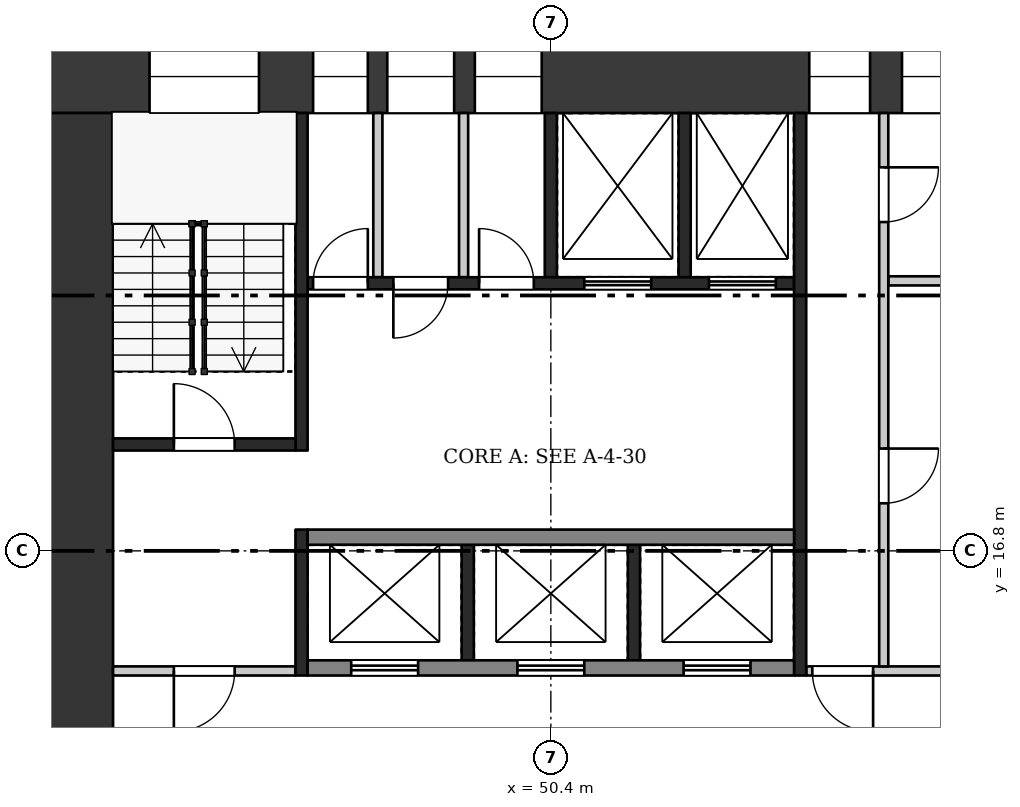
"""IFC4 building model, lengths in metres.
Left out: names, types, materials, properties, quantities, classifications, styles, units other than length and angle.
Written with IfcOpenShell. Run it as: python <this file> out.ifc"""

import sys

from ifc_helpers import new_model, si_unit, direction, frame, frame_2d, origin, place, context, subcontext, project, spatial, rectangle, extrude, element, fill, save


model = new_model("IFC4")
c1 = context("Model", 3, precision=1e-05, world=origin(), true_north=direction((0.0, 1.0)))
c2 = subcontext(c1, "Body", "Model", "MODEL_VIEW")
j1 = project(units=[si_unit("LENGTHUNIT", "METRE"), si_unit("PLANEANGLEUNIT", "RADIAN")], contexts=[c1])
p1 = place(None, origin())
s1 = spatial("IfcSite", under=j1, at=p1, CompositionType="ELEMENT")
p2 = place(p1, origin())
s2 = spatial("IfcBuilding", under=s1, at=p2, CompositionType="ELEMENT")
p3 = place(p2, frame((0.0, 0.0, 214.2)))
s3 = spatial("IfcBuildingStorey", under=s2, at=p3, CompositionType="ELEMENT", Elevation=214.2)
p4 = place(p3, frame((42.0, 24.6, 0.0), z_axis=(0.0, 0.0, 1.0), x_axis=(1.0, 0.0, 0.0)))
e1 = element("IfcWall", 1, at=p4, inside=s3, PredefinedType="SHEAR", context=c2, shape_type="SweptSolid", body=[
    extrude(rectangle(XDim=16.8, YDim=1.2, at=frame_2d((8.4, 0.0))), origin(), (0.0, 0.0, 1.0), 3.22),
])
p5 = place(p4, frame((1.8, 0.0, 0.5)))
e2 = element("IfcOpeningElement", 2, at=p5, cuts=e1, PredefinedType="OPENING", context=c2, shape_type="SweptSolid", body=[
    extrude(rectangle(XDim=1.8, YDim=2.4, at=frame_2d((0.9, 1.2))), frame((0.0, 0.61, 0.0), z_axis=(0.0, -1.0, 0.0), x_axis=(1.0, 0.0, 0.0)), (0.0, 0.0, 1.0), 1.22),
])
p6 = place(p4, frame((4.49, 0.0, 1.6)))
e3 = element("IfcOpeningElement", 3, at=p6, cuts=e1, PredefinedType="OPENING", context=c2, shape_type="SweptSolid", body=[
    extrude(rectangle(XDim=0.9, YDim=1.2, at=frame_2d((0.45, 0.6))), frame((0.0, 0.61, 0.0), z_axis=(0.0, -1.0, 0.0), x_axis=(1.0, 0.0, 0.0)), (0.0, 0.0, 1.0), 1.22),
])
p7 = place(p4, frame((5.71, 0.0, 1.6)))
e4 = element("IfcOpeningElement", 4, at=p7, cuts=e1, PredefinedType="OPENING", context=c2, shape_type="SweptSolid", body=[
    extrude(rectangle(XDim=1.1, YDim=1.2, at=frame_2d((0.55, 0.6))), frame((0.0, 0.61, 0.0), z_axis=(0.0, -1.0, 0.0), x_axis=(1.0, 0.0, 0.0)), (0.0, 0.0, 1.0), 1.22),
])
p8 = place(p4, frame((7.15, 0.0, 1.6)))
e5 = element("IfcOpeningElement", 5, at=p8, cuts=e1, PredefinedType="OPENING", context=c2, shape_type="SweptSolid", body=[
    extrude(rectangle(XDim=1.1, YDim=1.2, at=frame_2d((0.55, 0.6))), frame((0.0, 0.61, 0.0), z_axis=(0.0, -1.0, 0.0), x_axis=(1.0, 0.0, 0.0)), (0.0, 0.0, 1.0), 1.22),
])
p9 = place(p4, frame((12.65, 0.0, 0.6)))
e6 = element("IfcOpeningElement", 6, at=p9, cuts=e1, PredefinedType="OPENING", context=c2, shape_type="SweptSolid", body=[
    extrude(rectangle(XDim=1.0, YDim=2.1, at=frame_2d((0.5, 1.05))), frame((0.0, 0.61, 0.0), z_axis=(0.0, -1.0, 0.0), x_axis=(1.0, 0.0, 0.0)), (0.0, 0.0, 1.0), 1.22),
])
p10 = place(p4, frame((14.175, 0.0, 1.6)))
e7 = element("IfcOpeningElement", 7, at=p10, cuts=e1, PredefinedType="OPENING", context=c2, shape_type="SweptSolid", body=[
    extrude(rectangle(XDim=1.2, YDim=1.2, at=frame_2d((0.6, 0.6))), frame((0.0, 0.61, 0.0), z_axis=(0.0, -1.0, 0.0), x_axis=(1.0, 0.0, 0.0)), (0.0, 0.0, 1.0), 1.22),
])
p11 = place(p3, frame((42.6, 9.6, 0.0), z_axis=(0.0, 0.0, 1.0), x_axis=(0.0, 1.0, 0.0)))
e8 = element("IfcWall", 8, at=p11, inside=s3, PredefinedType="SHEAR", context=c2, shape_type="SweptSolid", body=[
    extrude(rectangle(XDim=14.4, YDim=1.2, at=frame_2d((7.2, 0.0))), origin(), (0.0, 0.0, 1.0), 3.22),
])
p12 = place(p11, frame((2.1, 0.0, 0.0)))
e9 = element("IfcOpeningElement", 9, at=p12, cuts=e8, PredefinedType="OPENING", context=c2, shape_type="SweptSolid", body=[
    extrude(rectangle(XDim=1.8, YDim=2.1, at=frame_2d((0.9, 1.05))), frame((0.0, 0.61, 0.0), z_axis=(0.0, -1.0, 0.0), x_axis=(1.0, 0.0, 0.0)), (0.0, 0.0, 1.0), 1.22),
])
for number, where, z_axis, x_axis in (
    (10, (49.033, 15.0, 0.0), (0.0, 0.0, 1.0), (0.0, 1.0, 0.0)),
    (11, (51.767, 15.0, 0.0), (0.0, 0.0, 1.0), (0.0, 1.0, 0.0)),
):
    element("IfcWall", number, at=place(p3, frame(where, z_axis=z_axis, x_axis=x_axis)), inside=s3, PredefinedType="SHEAR", context=c2, shape_type="SweptSolid", body=[
        extrude(rectangle(XDim=1.9, YDim=0.2, at=frame_2d((0.95, 0.0))), origin(), (0.0, 0.0, 1.0), 3.22),
    ])
p13 = place(p3, frame((46.4, 14.875, 0.0), z_axis=(0.0, 0.0, 1.0), x_axis=(1.0, 0.0, 0.0)))
e12 = element("IfcWall", 12, at=p13, inside=s3, PredefinedType="SHEAR", context=c2, shape_type="SweptSolid", body=[
    extrude(rectangle(XDim=8.0, YDim=0.25, at=frame_2d((4.0, 0.0))), origin(), (0.0, 0.0, 1.0), 3.22),
])
p14 = place(p13, frame((0.717, 0.0, 0.0)))
e13 = element("IfcOpeningElement", 13, at=p14, cuts=e12, PredefinedType="OPENING", context=c2, shape_type="SweptSolid", body=[
    extrude(rectangle(XDim=1.1, YDim=2.1, at=frame_2d((0.55, 1.05))), frame((0.0, 0.135, 0.0), z_axis=(0.0, -1.0, 0.0), x_axis=(1.0, 0.0, 0.0)), (0.0, 0.0, 1.0), 0.27),
])
p15 = place(p13, frame((3.45, 0.0, 0.0)))
e14 = element("IfcOpeningElement", 14, at=p15, cuts=e12, PredefinedType="OPENING", context=c2, shape_type="SweptSolid", body=[
    extrude(rectangle(XDim=1.1, YDim=2.1, at=frame_2d((0.55, 1.05))), frame((0.0, 0.135, 0.0), z_axis=(0.0, -1.0, 0.0), x_axis=(1.0, 0.0, 0.0)), (0.0, 0.0, 1.0), 0.27),
])
p16 = place(p13, frame((6.183, 0.0, 0.0)))
e15 = element("IfcOpeningElement", 15, at=p16, cuts=e12, PredefinedType="OPENING", context=c2, shape_type="SweptSolid", body=[
    extrude(rectangle(XDim=1.1, YDim=2.1, at=frame_2d((0.55, 1.05))), frame((0.0, 0.135, 0.0), z_axis=(0.0, -1.0, 0.0), x_axis=(1.0, 0.0, 0.0)), (0.0, 0.0, 1.0), 0.27),
])
p17 = place(p3, frame((46.4, 17.025, 0.0), z_axis=(0.0, 0.0, 1.0), x_axis=(1.0, 0.0, 0.0)))
e16 = element("IfcWall", 16, at=p17, inside=s3, PredefinedType="SHEAR", context=c2, shape_type="SweptSolid", body=[
    extrude(rectangle(XDim=8.0, YDim=0.25, at=frame_2d((4.0, 0.0))), origin(), (0.0, 0.0, 1.0), 3.22),
])
for number, where, z_axis, x_axis in (
    (17, (50.4, 21.3, 0.0), (0.0, 0.0, 1.0), (0.0, 1.0, 0.0)),
    (18, (52.6, 21.3, 0.0), (0.0, 0.0, 1.0), (0.0, 1.0, 0.0)),
):
    element("IfcWall", number, at=place(p3, frame(where, z_axis=z_axis, x_axis=x_axis)), inside=s3, PredefinedType="SHEAR", context=c2, shape_type="SweptSolid", body=[
        extrude(rectangle(XDim=2.7, YDim=0.2, at=frame_2d((1.35, 0.0))), origin(), (0.0, 0.0, 1.0), 3.22),
    ])
for number, where, z_axis, x_axis in (
    (19, (47.555, 21.3, 0.0), (0.0, 0.0, 1.0), (0.0, 1.0, 0.0)),
    (20, (48.965, 21.3, 0.0), (0.0, 0.0, 1.0), (0.0, 1.0, 0.0)),
):
    element("IfcWall", number, at=place(p3, frame(where, z_axis=z_axis, x_axis=x_axis)), inside=s3, PredefinedType="PARTITIONING", context=c2, shape_type="SweptSolid", body=[
        extrude(rectangle(XDim=2.7, YDim=0.15, at=frame_2d((1.35, 0.0))), origin(), (0.0, 0.0, 1.0), 3.22),
    ])
p18 = place(p3, frame((46.4, 21.2, 0.0), z_axis=(0.0, 0.0, 1.0), x_axis=(1.0, 0.0, 0.0)))
e21 = element("IfcWall", 21, at=p18, inside=s3, PredefinedType="SHEAR", context=c2, shape_type="SweptSolid", body=[
    extrude(rectangle(XDim=8.0, YDim=0.2, at=frame_2d((4.0, 0.0))), origin(), (0.0, 0.0, 1.0), 3.22),
])
p19 = place(p18, frame((0.09, 0.0, 0.0)))
e22 = element("IfcOpeningElement", 22, at=p19, cuts=e21, PredefinedType="OPENING", context=c2, shape_type="SweptSolid", body=[
    extrude(rectangle(XDim=0.9, YDim=2.1, at=frame_2d((0.45, 1.05))), frame((0.0, 0.11, 0.0), z_axis=(0.0, -1.0, 0.0), x_axis=(1.0, 0.0, 0.0)), (0.0, 0.0, 1.0), 0.22),
])
p20 = place(p18, frame((1.41, 0.0, 0.0)))
e23 = element("IfcOpeningElement", 23, at=p20, cuts=e21, PredefinedType="OPENING", context=c2, shape_type="SweptSolid", body=[
    extrude(rectangle(XDim=0.9, YDim=2.1, at=frame_2d((0.45, 1.05))), frame((0.0, 0.11, 0.0), z_axis=(0.0, -1.0, 0.0), x_axis=(1.0, 0.0, 0.0)), (0.0, 0.0, 1.0), 0.22),
])
p21 = place(p18, frame((2.82, 0.0, 0.0)))
e24 = element("IfcOpeningElement", 24, at=p21, cuts=e21, PredefinedType="OPENING", context=c2, shape_type="SweptSolid", body=[
    extrude(rectangle(XDim=0.9, YDim=2.1, at=frame_2d((0.45, 1.05))), frame((0.0, 0.11, 0.0), z_axis=(0.0, -1.0, 0.0), x_axis=(1.0, 0.0, 0.0)), (0.0, 0.0, 1.0), 0.22),
])
p22 = place(p18, frame((4.55, 0.0, 0.0)))
e25 = element("IfcOpeningElement", 25, at=p22, cuts=e21, PredefinedType="OPENING", context=c2, shape_type="SweptSolid", body=[
    extrude(rectangle(XDim=1.1, YDim=2.1, at=frame_2d((0.55, 1.05))), frame((0.0, 0.11, 0.0), z_axis=(0.0, -1.0, 0.0), x_axis=(1.0, 0.0, 0.0)), (0.0, 0.0, 1.0), 0.22),
])
p23 = place(p18, frame((6.6, 0.0, 0.0)))
e26 = element("IfcOpeningElement", 26, at=p23, cuts=e21, PredefinedType="OPENING", context=c2, shape_type="SweptSolid", body=[
    extrude(rectangle(XDim=1.1, YDim=2.1, at=frame_2d((0.55, 1.05))), frame((0.0, 0.11, 0.0), z_axis=(0.0, -1.0, 0.0), x_axis=(1.0, 0.0, 0.0)), (0.0, 0.0, 1.0), 0.22),
])
p24 = place(p3, frame((46.3, 14.75, 0.0), z_axis=(0.0, 0.0, 1.0), x_axis=(0.0, 1.0, 0.0)))
e27 = element("IfcWall", 27, at=p24, inside=s3, PredefinedType="SHEAR", context=c2, shape_type="SweptSolid", body=[
    extrude(rectangle(XDim=2.4, YDim=0.2, at=frame_2d((1.2, 0.0))), origin(), (0.0, 0.0, 1.0), 3.22),
])
p25 = place(p3, frame((46.3, 18.45, 0.0), z_axis=(0.0, 0.0, 1.0), x_axis=(0.0, 1.0, 0.0)))
e28 = element("IfcWall", 28, at=p25, inside=s3, PredefinedType="SHEAR", context=c2, shape_type="SweptSolid", body=[
    extrude(rectangle(XDim=5.55, YDim=0.2, at=frame_2d((2.775, 0.0))), origin(), (0.0, 0.0, 1.0), 3.22),
])
p26 = place(p3, frame((43.2, 14.825, 0.0), z_axis=(0.0, 0.0, 1.0), x_axis=(1.0, 0.0, 0.0)))
e29 = element("IfcWall", 29, at=p26, inside=s3, PredefinedType="PARTITIONING", context=c2, shape_type="SweptSolid", body=[
    extrude(rectangle(XDim=3.0, YDim=0.15, at=frame_2d((1.5, 0.0))), origin(), (0.0, 0.0, 1.0), 3.22),
])
p27 = place(p26, frame((1.0, 0.0, 0.0)))
e30 = element("IfcOpeningElement", 30, at=p27, cuts=e29, PredefinedType="OPENING", context=c2, shape_type="SweptSolid", body=[
    extrude(rectangle(XDim=1.0, YDim=2.1, at=frame_2d((0.5, 1.05))), frame((0.0, 0.085, 0.0), z_axis=(0.0, -1.0, 0.0), x_axis=(1.0, 0.0, 0.0)), (0.0, 0.0, 1.0), 0.17),
])
p28 = place(p3, frame((43.2, 18.55, 0.0), z_axis=(0.0, 0.0, 1.0), x_axis=(1.0, 0.0, 0.0)))
e31 = element("IfcWall", 31, at=p28, inside=s3, PredefinedType="SHEAR", context=c2, shape_type="SweptSolid", body=[
    extrude(rectangle(XDim=3.0, YDim=0.2, at=frame_2d((1.5, 0.0))), origin(), (0.0, 0.0, 1.0), 3.22),
])
p29 = place(p28, frame((1.0, 0.0, 0.0)))
e32 = element("IfcOpeningElement", 32, at=p29, cuts=e31, PredefinedType="OPENING", context=c2, shape_type="SweptSolid", body=[
    extrude(rectangle(XDim=1.0, YDim=2.1, at=frame_2d((0.5, 1.05))), frame((0.0, 0.11, 0.0), z_axis=(0.0, -1.0, 0.0), x_axis=(1.0, 0.0, 0.0)), (0.0, 0.0, 1.0), 0.22),
])
p30 = place(p3, frame((54.5, 14.75, 0.0), z_axis=(0.0, 0.0, 1.0), x_axis=(0.0, 1.0, 0.0)))
e33 = element("IfcWall", 33, at=p30, inside=s3, PredefinedType="SHEAR", context=c2, shape_type="SweptSolid", body=[
    extrude(rectangle(XDim=9.25, YDim=0.2, at=frame_2d((4.625, 0.0))), origin(), (0.0, 0.0, 1.0), 3.22),
])
p31 = place(p3, frame((54.6, 14.825, 0.0), z_axis=(0.0, 0.0, 1.0), x_axis=(1.0, 0.0, 0.0)))
e34 = element("IfcWall", 34, at=p31, inside=s3, PredefinedType="PARTITIONING", context=c2, shape_type="SweptSolid", body=[
    extrude(rectangle(XDim=3.0, YDim=0.15, at=frame_2d((1.5, 0.0))), origin(), (0.0, 0.0, 1.0), 3.22),
])
p32 = place(p31, frame((0.1, 0.0, 0.0)))
e35 = element("IfcOpeningElement", 35, at=p32, cuts=e34, PredefinedType="OPENING", context=c2, shape_type="SweptSolid", body=[
    extrude(rectangle(XDim=1.0, YDim=2.1, at=frame_2d((0.5, 1.05))), frame((0.0, 0.085, 0.0), z_axis=(0.0, -1.0, 0.0), x_axis=(1.0, 0.0, 0.0)), (0.0, 0.0, 1.0), 0.17),
])
p33 = place(p3, frame((55.95, 21.24, 0.0), z_axis=(0.0, 0.0, 1.0), x_axis=(1.0, 0.0, 0.0)))
e36 = element("IfcWall", 36, at=p33, inside=s3, PredefinedType="PARTITIONING", context=c2, shape_type="SweptSolid", body=[
    extrude(rectangle(XDim=1.65, YDim=0.15, at=frame_2d((0.825, 0.0))), origin(), (0.0, 0.0, 1.0), 3.22),
])
p34 = place(p3, frame((55.875, 14.9, 0.0), z_axis=(0.0, 0.0, 1.0), x_axis=(0.0, 1.0, 0.0)))
e37 = element("IfcWall", 37, at=p34, inside=s3, PredefinedType="PARTITIONING", context=c2, shape_type="SweptSolid", body=[
    extrude(rectangle(XDim=9.1, YDim=0.15, at=frame_2d((4.55, 0.0))), origin(), (0.0, 0.0, 1.0), 3.22),
])
p35 = place(p34, frame((2.683, 0.0, 0.0)))
e38 = element("IfcOpeningElement", 38, at=p35, cuts=e37, PredefinedType="OPENING", context=c2, shape_type="SweptSolid", body=[
    extrude(rectangle(XDim=0.9, YDim=2.1, at=frame_2d((0.45, 1.05))), frame((0.0, 0.085, 0.0), z_axis=(0.0, -1.0, 0.0), x_axis=(1.0, 0.0, 0.0)), (0.0, 0.0, 1.0), 0.17),
])
p36 = place(p34, frame((7.308, 0.0, 0.0)))
e39 = element("IfcOpeningElement", 39, at=p36, cuts=e37, PredefinedType="OPENING", context=c2, shape_type="SweptSolid", body=[
    extrude(rectangle(XDim=0.9, YDim=2.1, at=frame_2d((0.45, 1.05))), frame((0.0, 0.085, 0.0), z_axis=(0.0, -1.0, 0.0), x_axis=(1.0, 0.0, 0.0)), (0.0, 0.0, 1.0), 0.17),
])
p37 = place(p14, origin())
e40 = element("IfcDoor", 40, at=p37, inside=s3, OperationType="DOUBLE_DOOR_SLIDING", PredefinedType="DOOR", context=c2, shape_type="SweptSolid", body=[
    extrude(rectangle(XDim=1.1, YDim=2.1, at=frame_2d((0.55, 1.05))), frame((0.0, 0.025, 0.0), z_axis=(0.0, -1.0, 0.0), x_axis=(1.0, 0.0, 0.0)), (0.0, 0.0, 1.0), 0.05),
])
fill(e13, e40)
p38 = place(p15, origin())
e41 = element("IfcDoor", 41, at=p38, inside=s3, OperationType="DOUBLE_DOOR_SLIDING", PredefinedType="DOOR", context=c2, shape_type="SweptSolid", body=[
    extrude(rectangle(XDim=1.1, YDim=2.1, at=frame_2d((0.55, 1.05))), frame((0.0, 0.025, 0.0), z_axis=(0.0, -1.0, 0.0), x_axis=(1.0, 0.0, 0.0)), (0.0, 0.0, 1.0), 0.05),
])
fill(e14, e41)
p39 = place(p16, origin())
e42 = element("IfcDoor", 42, at=p39, inside=s3, OperationType="DOUBLE_DOOR_SLIDING", PredefinedType="DOOR", context=c2, shape_type="SweptSolid", body=[
    extrude(rectangle(XDim=1.1, YDim=2.1, at=frame_2d((0.55, 1.05))), frame((0.0, 0.025, 0.0), z_axis=(0.0, -1.0, 0.0), x_axis=(1.0, 0.0, 0.0)), (0.0, 0.0, 1.0), 0.05),
])
fill(e15, e42)
p40 = place(p19, origin())
e43 = element("IfcDoor", 43, at=p40, inside=s3, OperationType="SINGLE_SWING_RIGHT", PredefinedType="DOOR", context=c2, shape_type="SweptSolid", body=[
    extrude(rectangle(XDim=0.9, YDim=2.1, at=frame_2d((0.45, 1.05))), frame((0.0, 0.025, 0.0), z_axis=(0.0, -1.0, 0.0), x_axis=(1.0, 0.0, 0.0)), (0.0, 0.0, 1.0), 0.05),
])
fill(e22, e43)
p41 = place(p20, frame((0.9, 0.0, 0.0), z_axis=(0.0, 0.0, 1.0), x_axis=(-1.0, 0.0, 0.0)))
e44 = element("IfcDoor", 44, at=p41, inside=s3, OperationType="SINGLE_SWING_RIGHT", PredefinedType="DOOR", context=c2, shape_type="SweptSolid", body=[
    extrude(rectangle(XDim=0.9, YDim=2.1, at=frame_2d((0.45, 1.05))), frame((0.0, 0.025, 0.0), z_axis=(0.0, -1.0, 0.0), x_axis=(1.0, 0.0, 0.0)), (0.0, 0.0, 1.0), 0.05),
])
fill(e23, e44)
p42 = place(p21, origin())
e45 = element("IfcDoor", 45, at=p42, inside=s3, OperationType="SINGLE_SWING_LEFT", PredefinedType="DOOR", context=c2, shape_type="SweptSolid", body=[
    extrude(rectangle(XDim=0.9, YDim=2.1, at=frame_2d((0.45, 1.05))), frame((0.0, 0.025, 0.0), z_axis=(0.0, -1.0, 0.0), x_axis=(1.0, 0.0, 0.0)), (0.0, 0.0, 1.0), 0.05),
])
fill(e24, e45)
p43 = place(p22, origin())
e46 = element("IfcDoor", 46, at=p43, inside=s3, OperationType="DOUBLE_DOOR_SLIDING", PredefinedType="DOOR", context=c2, shape_type="SweptSolid", body=[
    extrude(rectangle(XDim=1.1, YDim=2.1, at=frame_2d((0.55, 1.05))), frame((0.0, 0.025, 0.0), z_axis=(0.0, -1.0, 0.0), x_axis=(1.0, 0.0, 0.0)), (0.0, 0.0, 1.0), 0.05),
])
fill(e25, e46)
p44 = place(p23, origin())
e47 = element("IfcDoor", 47, at=p44, inside=s3, OperationType="DOUBLE_DOOR_SLIDING", PredefinedType="DOOR", context=c2, shape_type="SweptSolid", body=[
    extrude(rectangle(XDim=1.1, YDim=2.1, at=frame_2d((0.55, 1.05))), frame((0.0, 0.025, 0.0), z_axis=(0.0, -1.0, 0.0), x_axis=(1.0, 0.0, 0.0)), (0.0, 0.0, 1.0), 0.05),
])
fill(e26, e47)
p45 = place(p27, frame((1.0, 0.0, 0.0), z_axis=(0.0, 0.0, 1.0), x_axis=(-1.0, 0.0, 0.0)))
e48 = element("IfcDoor", 48, at=p45, inside=s3, OperationType="SINGLE_SWING_RIGHT", PredefinedType="DOOR", context=c2, shape_type="SweptSolid", body=[
    extrude(rectangle(XDim=1.0, YDim=2.1, at=frame_2d((0.5, 1.05))), frame((0.0, 0.025, 0.0), z_axis=(0.0, -1.0, 0.0), x_axis=(1.0, 0.0, 0.0)), (0.0, 0.0, 1.0), 0.05),
])
fill(e30, e48)
p46 = place(p29, origin())
e49 = element("IfcDoor", 49, at=p46, inside=s3, OperationType="SINGLE_SWING_LEFT", PredefinedType="DOOR", context=c2, shape_type="SweptSolid", body=[
    extrude(rectangle(XDim=1.0, YDim=2.1, at=frame_2d((0.5, 1.05))), frame((0.0, 0.025, 0.0), z_axis=(0.0, -1.0, 0.0), x_axis=(1.0, 0.0, 0.0)), (0.0, 0.0, 1.0), 0.05),
])
fill(e32, e49)
p47 = place(p32, frame((1.0, 0.0, 0.0), z_axis=(0.0, 0.0, 1.0), x_axis=(-1.0, 0.0, 0.0)))
e50 = element("IfcDoor", 50, at=p47, inside=s3, OperationType="SINGLE_SWING_LEFT", PredefinedType="DOOR", context=c2, shape_type="SweptSolid", body=[
    extrude(rectangle(XDim=1.0, YDim=2.1, at=frame_2d((0.5, 1.05))), frame((0.0, 0.025, 0.0), z_axis=(0.0, -1.0, 0.0), x_axis=(1.0, 0.0, 0.0)), (0.0, 0.0, 1.0), 0.05),
])
fill(e35, e50)
p48 = place(p35, frame((0.9, 0.0, 0.0), z_axis=(0.0, 0.0, 1.0), x_axis=(-1.0, 0.0, 0.0)))
e51 = element("IfcDoor", 51, at=p48, inside=s3, OperationType="SINGLE_SWING_LEFT", PredefinedType="DOOR", context=c2, shape_type="SweptSolid", body=[
    extrude(rectangle(XDim=0.9, YDim=2.1, at=frame_2d((0.45, 1.05))), frame((0.0, 0.025, 0.0), z_axis=(0.0, -1.0, 0.0), x_axis=(1.0, 0.0, 0.0)), (0.0, 0.0, 1.0), 0.05),
])
fill(e38, e51)
p49 = place(p36, frame((0.9, 0.0, 0.0), z_axis=(0.0, 0.0, 1.0), x_axis=(-1.0, 0.0, 0.0)))
e52 = element("IfcDoor", 52, at=p49, inside=s3, OperationType="SINGLE_SWING_LEFT", PredefinedType="DOOR", context=c2, shape_type="SweptSolid", body=[
    extrude(rectangle(XDim=0.9, YDim=2.1, at=frame_2d((0.45, 1.05))), frame((0.0, 0.025, 0.0), z_axis=(0.0, -1.0, 0.0), x_axis=(1.0, 0.0, 0.0)), (0.0, 0.0, 1.0), 0.05),
])
fill(e39, e52)
p50 = place(p5, origin())
e53 = element("IfcWindow", 53, at=p50, inside=s3, PartitioningType="SINGLE_PANEL", PredefinedType="WINDOW", context=c2, shape_type="SweptSolid", body=[
    extrude(rectangle(XDim=1.8, YDim=2.4, at=frame_2d((0.9, 1.2))), frame((0.0, 0.03, 0.0), z_axis=(0.0, -1.0, 0.0), x_axis=(1.0, 0.0, 0.0)), (0.0, 0.0, 1.0), 0.06),
])
fill(e2, e53)
p51 = place(p6, origin())
e54 = element("IfcWindow", 54, at=p51, inside=s3, PartitioningType="SINGLE_PANEL", PredefinedType="WINDOW", context=c2, shape_type="SweptSolid", body=[
    extrude(rectangle(XDim=0.9, YDim=1.2, at=frame_2d((0.45, 0.6))), frame((0.0, 0.03, 0.0), z_axis=(0.0, -1.0, 0.0), x_axis=(1.0, 0.0, 0.0)), (0.0, 0.0, 1.0), 0.06),
])
fill(e3, e54)
p52 = place(p7, origin())
e55 = element("IfcWindow", 55, at=p52, inside=s3, PartitioningType="SINGLE_PANEL", PredefinedType="WINDOW", context=c2, shape_type="SweptSolid", body=[
    extrude(rectangle(XDim=1.1, YDim=1.2, at=frame_2d((0.55, 0.6))), frame((0.0, 0.03, 0.0), z_axis=(0.0, -1.0, 0.0), x_axis=(1.0, 0.0, 0.0)), (0.0, 0.0, 1.0), 0.06),
])
fill(e4, e55)
p53 = place(p8, origin())
e56 = element("IfcWindow", 56, at=p53, inside=s3, PartitioningType="SINGLE_PANEL", PredefinedType="WINDOW", context=c2, shape_type="SweptSolid", body=[
    extrude(rectangle(XDim=1.1, YDim=1.2, at=frame_2d((0.55, 0.6))), frame((0.0, 0.03, 0.0), z_axis=(0.0, -1.0, 0.0), x_axis=(1.0, 0.0, 0.0)), (0.0, 0.0, 1.0), 0.06),
])
fill(e5, e56)
p54 = place(p9, origin())
e57 = element("IfcWindow", 57, at=p54, inside=s3, PartitioningType="SINGLE_PANEL", PredefinedType="WINDOW", context=c2, shape_type="SweptSolid", body=[
    extrude(rectangle(XDim=1.0, YDim=2.1, at=frame_2d((0.5, 1.05))), frame((0.0, 0.03, 0.0), z_axis=(0.0, -1.0, 0.0), x_axis=(1.0, 0.0, 0.0)), (0.0, 0.0, 1.0), 0.06),
])
fill(e6, e57)
p55 = place(p10, origin())
e58 = element("IfcWindow", 58, at=p55, inside=s3, PartitioningType="SINGLE_PANEL", PredefinedType="WINDOW", context=c2, shape_type="SweptSolid", body=[
    extrude(rectangle(XDim=1.2, YDim=1.2, at=frame_2d((0.6, 0.6))), frame((0.0, 0.03, 0.0), z_axis=(0.0, -1.0, 0.0), x_axis=(1.0, 0.0, 0.0)), (0.0, 0.0, 1.0), 0.06),
])
fill(e7, e58)
save(model, sys.argv[1])
